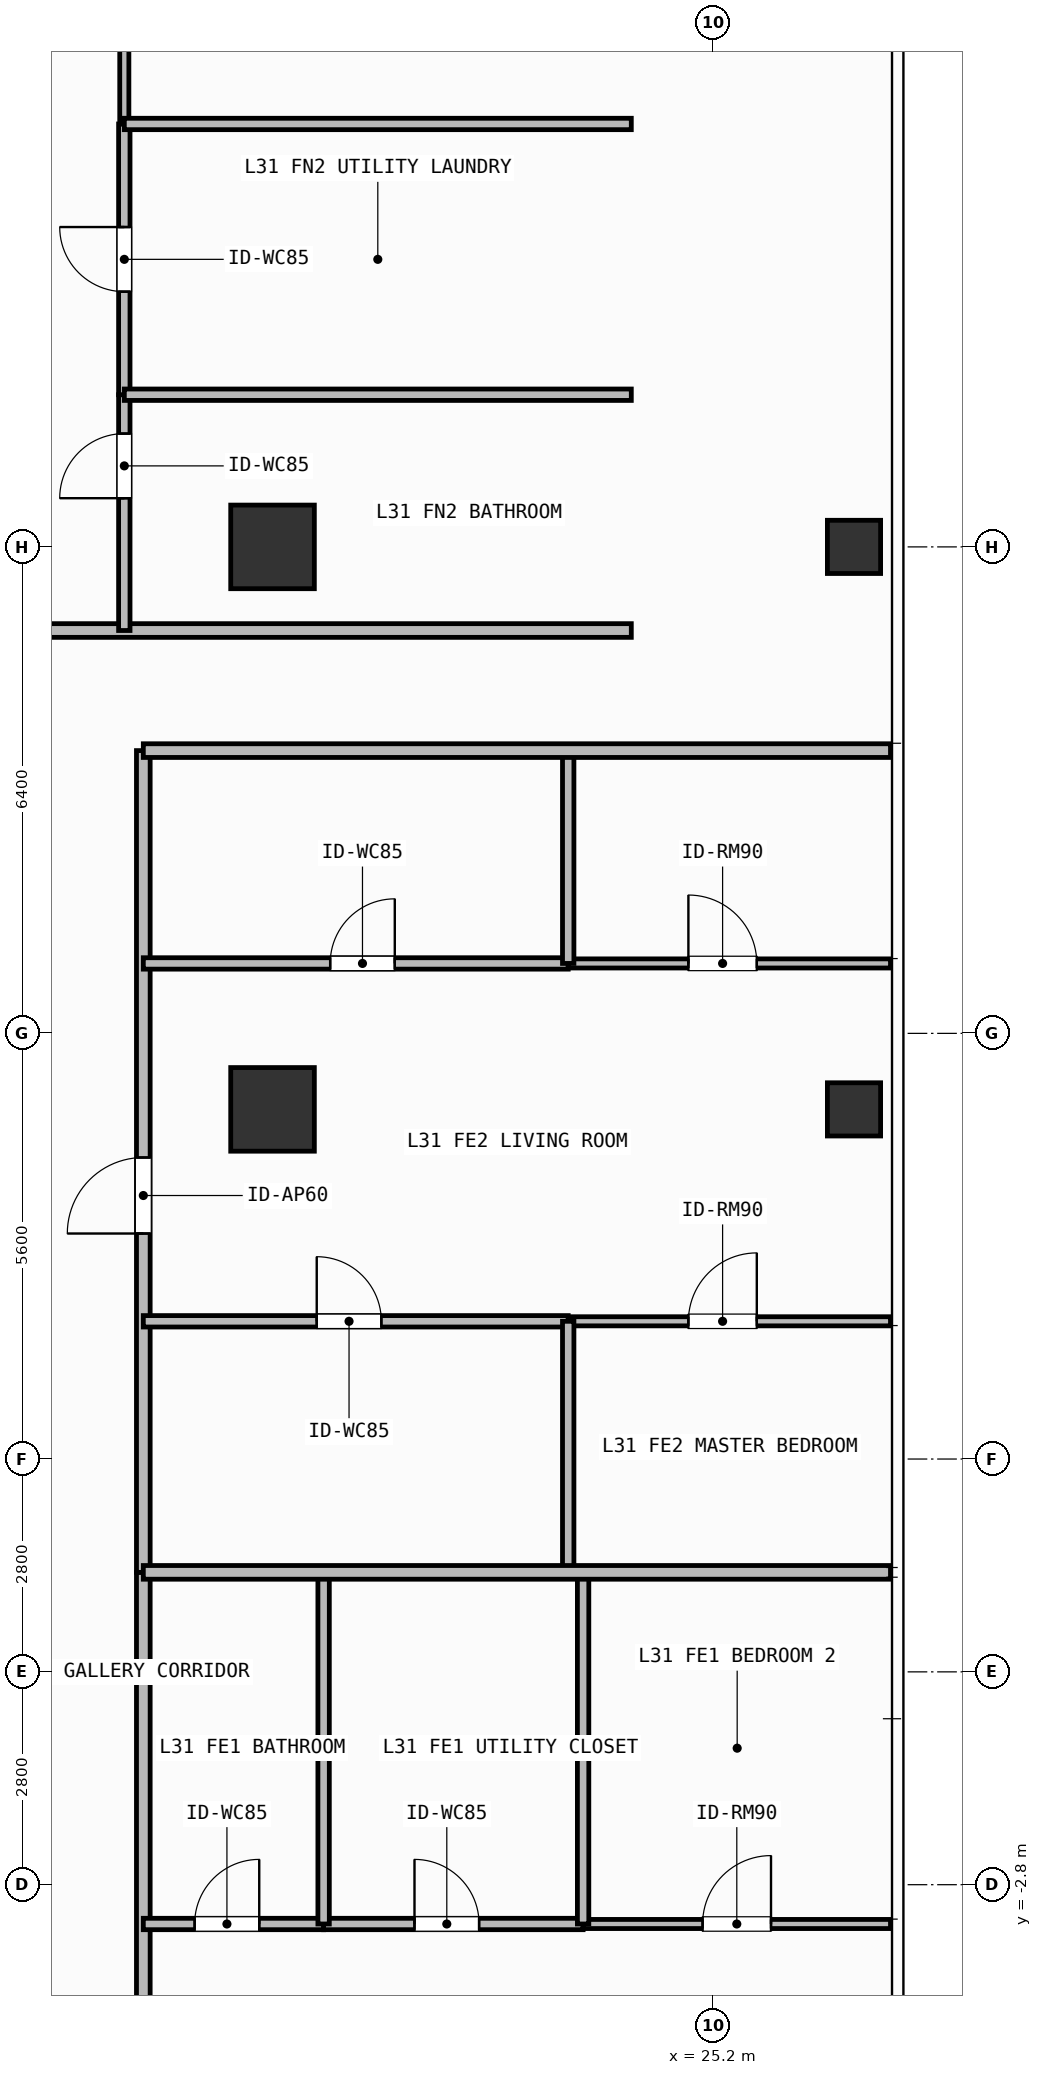
"""IFC4 building model, lengths in metres.
Left out: names, types, materials, properties, quantities, classifications, styles, units other than length and angle.
Written with IfcOpenShell. Run it as: python <this file> out.ifc"""

import sys

from ifc_helpers import new_model, si_unit, direction, frame, frame_2d, origin, origin_2d, place, context, subcontext, project, spatial, rectangle, hollow_rectangle, extrude, element, fill, save


model = new_model("IFC4")
c1 = context("Model", 3, precision=1e-05, world=origin(), true_north=direction((0.0, 1.0)))
c2 = subcontext(c1, "Body", "Model", "MODEL_VIEW")
j1 = project(units=[si_unit("LENGTHUNIT", "METRE"), si_unit("PLANEANGLEUNIT", "RADIAN")], contexts=[c1])
p1 = place(None, origin())
s1 = spatial("IfcSite", under=j1, at=p1, CompositionType="ELEMENT")
p2 = place(p1, origin())
s2 = spatial("IfcBuilding", under=s1, at=p2, CompositionType="ELEMENT")
p3 = place(p2, frame((0.0, 0.0, 125.1)))
s3 = spatial("IfcBuildingStorey", under=s2, at=p3, CompositionType="ELEMENT", Elevation=125.1)
for number, where, z_axis, x_axis in (
    (1, (19.4, 7.4, 0.0), (0.0, 0.0, 1.0), (1.0, 0.0, 0.0)),
    (2, (19.4, 14.8, 0.0), (0.0, 0.0, 1.0), (1.0, 0.0, 0.0)),
):
    element("IfcColumn", number, at=place(p3, frame(where, z_axis=z_axis, x_axis=x_axis)), inside=s3, PredefinedType="COLUMN", context=c2, shape_type="SweptSolid", body=[
        extrude(rectangle(XDim=1.1, YDim=1.1, at=origin_2d()), origin(), (0.0, 0.0, 1.0), 3.9),
    ])
for number, where, z_axis, x_axis in (
    (3, (27.05, 7.4, 0.0), (0.0, 0.0, 1.0), (1.0, 0.0, 0.0)),
    (4, (27.05, 14.8, 0.0), (0.0, 0.0, 1.0), (1.0, 0.0, 0.0)),
):
    element("IfcColumn", number, at=place(p3, frame(where, z_axis=z_axis, x_axis=x_axis)), inside=s3, PredefinedType="COLUMN", context=c2, shape_type="SweptSolid", body=[
        extrude(hollow_rectangle(XDim=0.7, YDim=0.7, WallThickness=0.032, at=origin_2d()), origin(), (0.0, 0.0, 1.0), 3.9),
    ])
p4 = place(p3, frame((1.474, 13.7, 0.0), z_axis=(0.0, 0.0, 1.0), x_axis=(1.0, 0.0, 0.0)))
e5 = element("IfcWall", 5, at=p4, inside=s3, PredefinedType="PARTITIONING", context=c2, shape_type="SweptSolid", body=[
    extrude(rectangle(XDim=22.646, YDim=0.18, at=frame_2d((11.323, 0.0))), origin(), (0.0, 0.0, 1.0), 3.68),
])
p5 = place(p4, frame((10.196, 0.0, 0.0)))
e6 = element("IfcOpeningElement", 6, at=p5, cuts=e5, PredefinedType="OPENING", context=c2, shape_type="SweptSolid", body=[
    extrude(rectangle(XDim=1.0, YDim=2.2, at=frame_2d((0.5, 1.1))), frame((0.0, 0.1, 0.0), z_axis=(0.0, -1.0, 0.0), x_axis=(1.0, 0.0, 0.0)), (0.0, 0.0, 1.0), 0.2),
])
p6 = place(p3, frame((17.45, 13.7, 0.0), z_axis=(0.0, 0.0, 1.0), x_axis=(0.0, 1.0, 0.0)))
e7 = element("IfcWall", 7, at=p6, inside=s3, PredefinedType="PARTITIONING", context=c2, shape_type="SweptSolid", body=[
    extrude(rectangle(XDim=3.102, YDim=0.15, at=frame_2d((1.551, 0.0))), origin(), (0.0, 0.0, 1.0), 3.68),
])
p7 = place(p6, frame((1.741, 0.0, 0.0)))
e8 = element("IfcOpeningElement", 8, at=p7, cuts=e7, PredefinedType="OPENING", context=c2, shape_type="SweptSolid", body=[
    extrude(rectangle(XDim=0.85, YDim=2.1, at=frame_2d((0.425, 1.05))), frame((0.0, 0.085, 0.0), z_axis=(0.0, -1.0, 0.0), x_axis=(1.0, 0.0, 0.0)), (0.0, 0.0, 1.0), 0.17),
])
p8 = place(p3, frame((17.45, 16.802, 0.0), z_axis=(0.0, 0.0, 1.0), x_axis=(0.0, 1.0, 0.0)))
e9 = element("IfcWall", 9, at=p8, inside=s3, PredefinedType="PARTITIONING", context=c2, shape_type="SweptSolid", body=[
    extrude(rectangle(XDim=3.562, YDim=0.15, at=frame_2d((1.781, 0.0))), origin(), (0.0, 0.0, 1.0), 3.68),
])
p9 = place(p8, frame((1.356, 0.0, 0.0)))
e10 = element("IfcOpeningElement", 10, at=p9, cuts=e9, PredefinedType="OPENING", context=c2, shape_type="SweptSolid", body=[
    extrude(rectangle(XDim=0.85, YDim=2.1, at=frame_2d((0.425, 1.05))), frame((0.0, 0.085, 0.0), z_axis=(0.0, -1.0, 0.0), x_axis=(1.0, 0.0, 0.0)), (0.0, 0.0, 1.0), 0.17),
])
p10 = place(p3, frame((17.45, 20.364, 0.0), z_axis=(0.0, 0.0, 1.0), x_axis=(0.0, 1.0, 0.0)))
e11 = element("IfcWall", 11, at=p10, inside=s3, PredefinedType="PARTITIONING", context=c2, shape_type="SweptSolid", body=[
    extrude(rectangle(XDim=4.826, YDim=0.12, at=frame_2d((2.413, 0.0))), origin(), (0.0, 0.0, 1.0), 3.68),
])
p11 = place(p10, frame((1.901, 0.0, 0.0)))
e12 = element("IfcOpeningElement", 12, at=p11, cuts=e11, PredefinedType="OPENING", context=c2, shape_type="SweptSolid", body=[
    extrude(rectangle(XDim=0.85, YDim=2.1, at=frame_2d((0.425, 1.05))), frame((0.0, 0.07, 0.0), z_axis=(0.0, -1.0, 0.0), x_axis=(1.0, 0.0, 0.0)), (0.0, 0.0, 1.0), 0.14),
])
p12 = place(p3, frame((17.7, -12.12, 0.0), z_axis=(0.0, 0.0, 1.0), x_axis=(0.0, 1.0, 0.0)))
e13 = element("IfcWall", 13, at=p12, inside=s3, PredefinedType="PARTITIONING", context=c2, shape_type="SweptSolid", body=[
    extrude(rectangle(XDim=13.429, YDim=0.18, at=frame_2d((6.715, 0.0))), origin(), (0.0, 0.0, 1.0), 3.68),
])
p13 = place(p12, frame((5.324, 0.0, 0.0)))
e14 = element("IfcOpeningElement", 14, at=p13, cuts=e13, PredefinedType="OPENING", context=c2, shape_type="SweptSolid", body=[
    extrude(rectangle(XDim=1.0, YDim=2.2, at=frame_2d((0.5, 1.1))), frame((0.0, 0.1, 0.0), z_axis=(0.0, -1.0, 0.0), x_axis=(1.0, 0.0, 0.0)), (0.0, 0.0, 1.0), 0.2),
])
p14 = place(p3, frame((17.7, -3.317, 0.0), z_axis=(0.0, 0.0, 1.0), x_axis=(1.0, 0.0, 0.0)))
e15 = element("IfcWall", 15, at=p14, inside=s3, PredefinedType="PARTITIONING", context=c2, shape_type="SweptSolid", body=[
    extrude(rectangle(XDim=2.372, YDim=0.15, at=frame_2d((1.186, 0.0))), origin(), (0.0, 0.0, 1.0), 3.68),
])
p15 = place(p14, frame((0.675, 0.0, 0.0)))
e16 = element("IfcOpeningElement", 16, at=p15, cuts=e15, PredefinedType="OPENING", context=c2, shape_type="SweptSolid", body=[
    extrude(rectangle(XDim=0.85, YDim=2.1, at=frame_2d((0.425, 1.05))), frame((0.0, 0.085, 0.0), z_axis=(0.0, -1.0, 0.0), x_axis=(1.0, 0.0, 0.0)), (0.0, 0.0, 1.0), 0.17),
])
p16 = place(p3, frame((20.072, -3.317, 0.0), z_axis=(0.0, 0.0, 1.0), x_axis=(1.0, 0.0, 0.0)))
e17 = element("IfcWall", 17, at=p16, inside=s3, PredefinedType="PARTITIONING", context=c2, shape_type="SweptSolid", body=[
    extrude(rectangle(XDim=3.414, YDim=0.15, at=frame_2d((1.707, 0.0))), origin(), (0.0, 0.0, 1.0), 3.68),
])
p17 = place(p16, frame((1.196, 0.0, 0.0)))
e18 = element("IfcOpeningElement", 18, at=p17, cuts=e17, PredefinedType="OPENING", context=c2, shape_type="SweptSolid", body=[
    extrude(rectangle(XDim=0.85, YDim=2.1, at=frame_2d((0.425, 1.05))), frame((0.0, 0.085, 0.0), z_axis=(0.0, -1.0, 0.0), x_axis=(1.0, 0.0, 0.0)), (0.0, 0.0, 1.0), 0.17),
])
p18 = place(p3, frame((23.486, -3.317, 0.0), z_axis=(0.0, 0.0, 1.0), x_axis=(1.0, 0.0, 0.0)))
e19 = element("IfcWall", 19, at=p18, inside=s3, PredefinedType="PARTITIONING", context=c2, shape_type="SweptSolid", body=[
    extrude(rectangle(XDim=4.044, YDim=0.12, at=frame_2d((2.022, 0.0))), origin(), (0.0, 0.0, 1.0), 3.68),
])
p19 = place(p18, frame((1.572, 0.0, 0.0)))
e20 = element("IfcOpeningElement", 20, at=p19, cuts=e19, PredefinedType="OPENING", context=c2, shape_type="SweptSolid", body=[
    extrude(rectangle(XDim=0.9, YDim=2.1, at=frame_2d((0.45, 1.05))), frame((0.0, 0.07, 0.0), z_axis=(0.0, -1.0, 0.0), x_axis=(1.0, 0.0, 0.0)), (0.0, 0.0, 1.0), 0.14),
])
p20 = place(p3, frame((17.7, 1.309, 0.0), z_axis=(0.0, 0.0, 1.0), x_axis=(0.0, 1.0, 0.0)))
e21 = element("IfcWall", 21, at=p20, inside=s3, PredefinedType="PARTITIONING", context=c2, shape_type="SweptSolid", body=[
    extrude(rectangle(XDim=10.811, YDim=0.18, at=frame_2d((5.406, 0.0))), origin(), (0.0, 0.0, 1.0), 3.68),
])
p21 = place(p20, frame((4.458, 0.0, 0.0)))
e22 = element("IfcOpeningElement", 22, at=p21, cuts=e21, PredefinedType="OPENING", context=c2, shape_type="SweptSolid", body=[
    extrude(rectangle(XDim=1.0, YDim=2.2, at=frame_2d((0.5, 1.1))), frame((0.0, 0.1, 0.0), z_axis=(0.0, -1.0, 0.0), x_axis=(1.0, 0.0, 0.0)), (0.0, 0.0, 1.0), 0.2),
])
p22 = place(p3, frame((17.7, 9.32, 0.0), z_axis=(0.0, 0.0, 1.0), x_axis=(1.0, 0.0, 0.0)))
e23 = element("IfcWall", 23, at=p22, inside=s3, PredefinedType="PARTITIONING", context=c2, shape_type="SweptSolid", body=[
    extrude(rectangle(XDim=5.59, YDim=0.15, at=frame_2d((2.795, 0.0))), origin(), (0.0, 0.0, 1.0), 3.68),
])
p23 = place(p22, frame((2.458, 0.0, 0.0)))
e24 = element("IfcOpeningElement", 24, at=p23, cuts=e23, PredefinedType="OPENING", context=c2, shape_type="SweptSolid", body=[
    extrude(rectangle(XDim=0.85, YDim=2.1, at=frame_2d((0.425, 1.05))), frame((0.0, 0.085, 0.0), z_axis=(0.0, -1.0, 0.0), x_axis=(1.0, 0.0, 0.0)), (0.0, 0.0, 1.0), 0.17),
])
p24 = place(p3, frame((17.7, 4.612, 0.0), z_axis=(0.0, 0.0, 1.0), x_axis=(1.0, 0.0, 0.0)))
e25 = element("IfcWall", 25, at=p24, inside=s3, PredefinedType="PARTITIONING", context=c2, shape_type="SweptSolid", body=[
    extrude(rectangle(XDim=5.59, YDim=0.15, at=frame_2d((2.795, 0.0))), origin(), (0.0, 0.0, 1.0), 3.68),
])
p25 = place(p24, frame((2.281, 0.0, 0.0)))
e26 = element("IfcOpeningElement", 26, at=p25, cuts=e25, PredefinedType="OPENING", context=c2, shape_type="SweptSolid", body=[
    extrude(rectangle(XDim=0.85, YDim=2.1, at=frame_2d((0.425, 1.05))), frame((0.0, 0.085, 0.0), z_axis=(0.0, -1.0, 0.0), x_axis=(1.0, 0.0, 0.0)), (0.0, 0.0, 1.0), 0.17),
])
p26 = place(p3, frame((23.29, 4.612, 0.0), z_axis=(0.0, 0.0, 1.0), x_axis=(1.0, 0.0, 0.0)))
e27 = element("IfcWall", 27, at=p26, inside=s3, PredefinedType="PARTITIONING", context=c2, shape_type="SweptSolid", body=[
    extrude(rectangle(XDim=4.24, YDim=0.12, at=frame_2d((2.12, 0.0))), origin(), (0.0, 0.0, 1.0), 3.68),
])
p27 = place(p26, frame((1.581, 0.0, 0.0)))
e28 = element("IfcOpeningElement", 28, at=p27, cuts=e27, PredefinedType="OPENING", context=c2, shape_type="SweptSolid", body=[
    extrude(rectangle(XDim=0.9, YDim=2.1, at=frame_2d((0.45, 1.05))), frame((0.0, 0.07, 0.0), z_axis=(0.0, -1.0, 0.0), x_axis=(1.0, 0.0, 0.0)), (0.0, 0.0, 1.0), 0.14),
])
p28 = place(p3, frame((23.29, 9.32, 0.0), z_axis=(0.0, 0.0, 1.0), x_axis=(1.0, 0.0, 0.0)))
e29 = element("IfcWall", 29, at=p28, inside=s3, PredefinedType="PARTITIONING", context=c2, shape_type="SweptSolid", body=[
    extrude(rectangle(XDim=4.24, YDim=0.12, at=frame_2d((2.12, 0.0))), origin(), (0.0, 0.0, 1.0), 3.68),
])
p29 = place(p28, frame((1.581, 0.0, 0.0)))
e30 = element("IfcOpeningElement", 30, at=p29, cuts=e29, PredefinedType="OPENING", context=c2, shape_type="SweptSolid", body=[
    extrude(rectangle(XDim=0.9, YDim=2.1, at=frame_2d((0.45, 1.05))), frame((0.0, 0.07, 0.0), z_axis=(0.0, -1.0, 0.0), x_axis=(1.0, 0.0, 0.0)), (0.0, 0.0, 1.0), 0.14),
])
for number, where, z_axis, x_axis in (
    (31, (17.45, 16.802, 0.0), (0.0, 0.0, 1.0), (1.0, 0.0, 0.0)),
    (32, (17.45, 20.364, 0.0), (0.0, 0.0, 1.0), (1.0, 0.0, 0.0)),
):
    element("IfcWall", number, at=place(p3, frame(where, z_axis=z_axis, x_axis=x_axis)), inside=s3, PredefinedType="PARTITIONING", context=c2, shape_type="SweptSolid", body=[
        extrude(rectangle(XDim=6.67, YDim=0.15, at=frame_2d((3.335, 0.0))), origin(), (0.0, 0.0, 1.0), 3.68),
    ])
for number, where, z_axis, x_axis in (
    (33, (20.072, -3.317, 0.0), (0.0, 0.0, 1.0), (0.0, 1.0, 0.0)),
    (34, (23.486, -3.317, 0.0), (0.0, 0.0, 1.0), (0.0, 1.0, 0.0)),
):
    element("IfcWall", number, at=place(p3, frame(where, z_axis=z_axis, x_axis=x_axis)), inside=s3, PredefinedType="PARTITIONING", context=c2, shape_type="SweptSolid", body=[
        extrude(rectangle(XDim=4.626, YDim=0.15, at=frame_2d((2.313, 0.0))), origin(), (0.0, 0.0, 1.0), 3.68),
    ])
p30 = place(p3, frame((23.29, 1.309, 0.0), z_axis=(0.0, 0.0, 1.0), x_axis=(0.0, 1.0, 0.0)))
e35 = element("IfcWall", 35, at=p30, inside=s3, PredefinedType="PARTITIONING", context=c2, shape_type="SweptSolid", body=[
    extrude(rectangle(XDim=3.303, YDim=0.15, at=frame_2d((1.651, 0.0))), origin(), (0.0, 0.0, 1.0), 3.68),
])
p31 = place(p3, frame((23.29, 9.32, 0.0), z_axis=(0.0, 0.0, 1.0), x_axis=(0.0, 1.0, 0.0)))
e36 = element("IfcWall", 36, at=p31, inside=s3, PredefinedType="PARTITIONING", context=c2, shape_type="SweptSolid", body=[
    extrude(rectangle(XDim=2.8, YDim=0.15, at=frame_2d((1.4, 0.0))), origin(), (0.0, 0.0, 1.0), 3.68),
])
for number, where, z_axis, x_axis in (
    (37, (17.7, 1.309, 0.0), (0.0, 0.0, 1.0), (1.0, 0.0, 0.0)),
    (38, (17.7, 12.12, 0.0), (0.0, 0.0, 1.0), (1.0, 0.0, 0.0)),
):
    element("IfcWall", number, at=place(p3, frame(where, z_axis=z_axis, x_axis=x_axis)), inside=s3, PredefinedType="PARTITIONING", context=c2, shape_type="SweptSolid", body=[
        extrude(rectangle(XDim=9.83, YDim=0.18, at=frame_2d((4.915, 0.0))), origin(), (0.0, 0.0, 1.0), 3.68),
    ])
p32 = place(p7, origin())
e39 = element("IfcDoor", 39, at=p32, inside=s3, OperationType="SINGLE_SWING_LEFT", PredefinedType="DOOR", context=c2, shape_type="SweptSolid", body=[
    extrude(rectangle(XDim=0.85, YDim=2.1, at=frame_2d((0.425, 1.05))), frame((0.0, 0.025, 0.0), z_axis=(0.0, -1.0, 0.0), x_axis=(1.0, 0.0, 0.0)), (0.0, 0.0, 1.0), 0.05),
])
fill(e8, e39)
p33 = place(p9, origin())
e40 = element("IfcDoor", 40, at=p33, inside=s3, OperationType="SINGLE_SWING_RIGHT", PredefinedType="DOOR", context=c2, shape_type="SweptSolid", body=[
    extrude(rectangle(XDim=0.85, YDim=2.1, at=frame_2d((0.425, 1.05))), frame((0.0, 0.025, 0.0), z_axis=(0.0, -1.0, 0.0), x_axis=(1.0, 0.0, 0.0)), (0.0, 0.0, 1.0), 0.05),
])
fill(e10, e40)
p34 = place(p15, origin())
e41 = element("IfcDoor", 41, at=p34, inside=s3, OperationType="SINGLE_SWING_RIGHT", PredefinedType="DOOR", context=c2, shape_type="SweptSolid", body=[
    extrude(rectangle(XDim=0.85, YDim=2.1, at=frame_2d((0.425, 1.05))), frame((0.0, 0.025, 0.0), z_axis=(0.0, -1.0, 0.0), x_axis=(1.0, 0.0, 0.0)), (0.0, 0.0, 1.0), 0.05),
])
fill(e16, e41)
p35 = place(p17, origin())
e42 = element("IfcDoor", 42, at=p35, inside=s3, OperationType="SINGLE_SWING_LEFT", PredefinedType="DOOR", context=c2, shape_type="SweptSolid", body=[
    extrude(rectangle(XDim=0.85, YDim=2.1, at=frame_2d((0.425, 1.05))), frame((0.0, 0.025, 0.0), z_axis=(0.0, -1.0, 0.0), x_axis=(1.0, 0.0, 0.0)), (0.0, 0.0, 1.0), 0.05),
])
fill(e18, e42)
p36 = place(p19, origin())
e43 = element("IfcDoor", 43, at=p36, inside=s3, OperationType="SINGLE_SWING_RIGHT", PredefinedType="DOOR", context=c2, shape_type="SweptSolid", body=[
    extrude(rectangle(XDim=0.9, YDim=2.1, at=frame_2d((0.45, 1.05))), frame((0.0, 0.025, 0.0), z_axis=(0.0, -1.0, 0.0), x_axis=(1.0, 0.0, 0.0)), (0.0, 0.0, 1.0), 0.05),
])
fill(e20, e43)
p37 = place(p21, origin())
e44 = element("IfcDoor", 44, at=p37, inside=s3, OperationType="SINGLE_SWING_LEFT", PredefinedType="DOOR", context=c2, shape_type="SweptSolid", body=[
    extrude(rectangle(XDim=1.0, YDim=2.2, at=frame_2d((0.5, 1.1))), frame((0.0, 0.025, 0.0), z_axis=(0.0, -1.0, 0.0), x_axis=(1.0, 0.0, 0.0)), (0.0, 0.0, 1.0), 0.05),
])
fill(e22, e44)
p38 = place(p23, origin())
e45 = element("IfcDoor", 45, at=p38, inside=s3, OperationType="SINGLE_SWING_RIGHT", PredefinedType="DOOR", context=c2, shape_type="SweptSolid", body=[
    extrude(rectangle(XDim=0.85, YDim=2.1, at=frame_2d((0.425, 1.05))), frame((0.0, 0.025, 0.0), z_axis=(0.0, -1.0, 0.0), x_axis=(1.0, 0.0, 0.0)), (0.0, 0.0, 1.0), 0.05),
])
fill(e24, e45)
p39 = place(p25, origin())
e46 = element("IfcDoor", 46, at=p39, inside=s3, OperationType="SINGLE_SWING_LEFT", PredefinedType="DOOR", context=c2, shape_type="SweptSolid", body=[
    extrude(rectangle(XDim=0.85, YDim=2.1, at=frame_2d((0.425, 1.05))), frame((0.0, 0.025, 0.0), z_axis=(0.0, -1.0, 0.0), x_axis=(1.0, 0.0, 0.0)), (0.0, 0.0, 1.0), 0.05),
])
fill(e26, e46)
p40 = place(p27, origin())
e47 = element("IfcDoor", 47, at=p40, inside=s3, OperationType="SINGLE_SWING_RIGHT", PredefinedType="DOOR", context=c2, shape_type="SweptSolid", body=[
    extrude(rectangle(XDim=0.9, YDim=2.1, at=frame_2d((0.45, 1.05))), frame((0.0, 0.025, 0.0), z_axis=(0.0, -1.0, 0.0), x_axis=(1.0, 0.0, 0.0)), (0.0, 0.0, 1.0), 0.05),
])
fill(e28, e47)
p41 = place(p29, origin())
e48 = element("IfcDoor", 48, at=p41, inside=s3, OperationType="SINGLE_SWING_LEFT", PredefinedType="DOOR", context=c2, shape_type="SweptSolid", body=[
    extrude(rectangle(XDim=0.9, YDim=2.1, at=frame_2d((0.45, 1.05))), frame((0.0, 0.025, 0.0), z_axis=(0.0, -1.0, 0.0), x_axis=(1.0, 0.0, 0.0)), (0.0, 0.0, 1.0), 0.05),
])
fill(e30, e48)
save(model, sys.argv[1])
